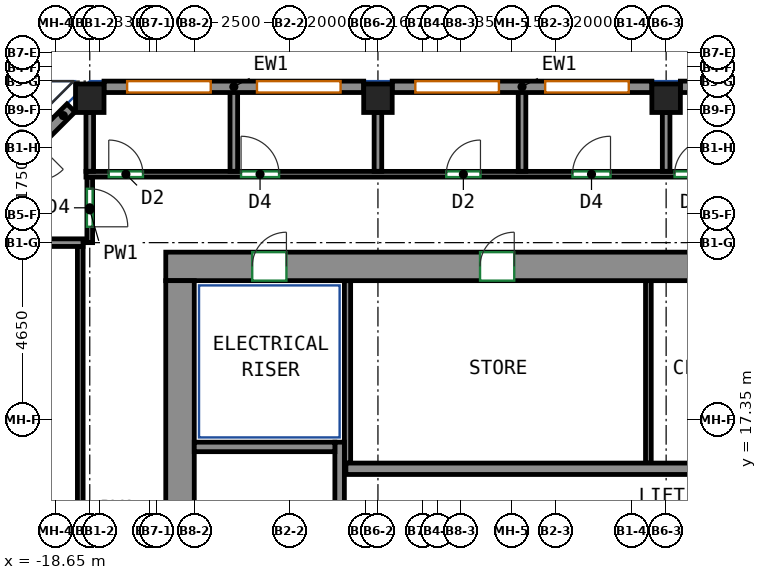
"""IFC4 building model, lengths in metres.
Left out: names, types, materials, properties, quantities, classifications, styles, units other than length and angle.
Written with IfcOpenShell. Run it as: python <this file> out.ifc"""

import sys

from ifc_helpers import new_model, si_unit, direction, frame, frame_2d, origin, origin_2d, place, context, subcontext, project, spatial, rectangle, extrude, source, transform, mapped, element, fill, save


model = new_model("IFC4")
c1 = context("Model", 3, precision=1e-05, world=origin(), true_north=direction((0.0, 1.0)))
c2 = subcontext(c1, "Body", "Model", "MODEL_VIEW")
j1 = project(units=[si_unit("LENGTHUNIT", "METRE"), si_unit("PLANEANGLEUNIT", "RADIAN")], contexts=[c1])
p1 = place(None, origin())
s1 = spatial("IfcSite", under=j1, at=p1, CompositionType="ELEMENT")
p2 = place(p1, origin())
s2 = spatial("IfcBuilding", under=s1, at=p2, CompositionType="ELEMENT")
p3 = place(p2, frame((0.0, 0.0, 199.9)))
s3 = spatial("IfcBuildingStorey", under=s2, at=p3, CompositionType="ELEMENT", Elevation=199.9)
m1 = source(origin(), c2, "Body", "SweptSolid", [
    extrude(rectangle(XDim=0.75, YDim=0.75, at=origin_2d()), origin(), (0.0, 0.0, 1.0), 3.12),
])
for number, where, z_axis, x_axis in (
    (1, (-17.75, 25.8, 0.0), (0.0, 0.0, 1.0), (1.0, 0.0, 0.0)),
    (2, (-10.167, 25.8, 0.0), (0.0, 0.0, 1.0), (1.0, 0.0, 0.0)),
    (3, (-2.583, 25.8, 0.0), (0.0, 0.0, 1.0), (1.0, 0.0, 0.0)),
):
    element("IfcColumn", number, at=place(p3, frame(where, z_axis=z_axis, x_axis=x_axis)), inside=s3, PredefinedType="COLUMN", context=c2, shape_type="MappedRepresentation", body=[
        mapped(m1, transform((0.0, 0.0, 0.0))),
    ])
m2 = source(origin(), c2, "Body", "SweptSolid", [
    extrude(rectangle(XDim=33.6, YDim=0.75, at=frame_2d((16.8, 0.0))), origin(), (0.0, 0.0, 1.0), 3.12),
])
p4 = place(p3, frame((-15.75, 21.375, 0.0), z_axis=(0.0, 0.0, 1.0), x_axis=(1.0, 0.0, 0.0)))
e4 = element("IfcWall", 4, at=p4, inside=s3, PredefinedType="SHEAR", context=c2, shape_type="MappedRepresentation", body=[
    mapped(m2, transform((0.0, 0.0, 0.0))),
])
p5 = place(p4, frame((8.27, 0.0, 0.0)))
e5 = element("IfcOpeningElement", 5, at=p5, cuts=e4, PredefinedType="OPENING", context=c2, shape_type="SweptSolid", body=[
    extrude(rectangle(XDim=0.9, YDim=2.1, at=frame_2d((0.45, 1.05))), frame((0.0, 0.385, 0.0), z_axis=(0.0, -1.0, 0.0), x_axis=(1.0, 0.0, 0.0)), (0.0, 0.0, 1.0), 0.77),
])
p6 = place(p4, frame((14.97, 0.0, 0.0)))
e6 = element("IfcOpeningElement", 6, at=p6, cuts=e4, PredefinedType="OPENING", context=c2, shape_type="SweptSolid", body=[
    extrude(rectangle(XDim=0.9, YDim=2.1, at=frame_2d((0.45, 1.05))), frame((0.0, 0.385, 0.0), z_axis=(0.0, -1.0, 0.0), x_axis=(1.0, 0.0, 0.0)), (0.0, 0.0, 1.0), 0.77),
])
p7 = place(p4, frame((19.794, 0.0, 0.0)))
e7 = element("IfcOpeningElement", 7, at=p7, cuts=e4, PredefinedType="OPENING", context=c2, shape_type="SweptSolid", body=[
    extrude(rectangle(XDim=0.9, YDim=2.1, at=frame_2d((0.45, 1.05))), frame((0.0, 0.385, 0.0), z_axis=(0.0, -1.0, 0.0), x_axis=(1.0, 0.0, 0.0)), (0.0, 0.0, 1.0), 0.77),
])
p8 = place(p4, frame((25.154, 0.0, 0.0)))
e8 = element("IfcOpeningElement", 8, at=p8, cuts=e4, PredefinedType="OPENING", context=c2, shape_type="SweptSolid", body=[
    extrude(rectangle(XDim=0.9, YDim=2.1, at=frame_2d((0.45, 1.05))), frame((0.0, 0.385, 0.0), z_axis=(0.0, -1.0, 0.0), x_axis=(1.0, 0.0, 0.0)), (0.0, 0.0, 1.0), 0.77),
])
p9 = place(p4, frame((2.275, 0.0, 0.0)))
e9 = element("IfcOpeningElement", 9, at=p9, cuts=e4, PredefinedType="OPENING", context=c2, shape_type="SweptSolid", body=[
    extrude(rectangle(XDim=0.9, YDim=2.1, at=frame_2d((0.45, 1.05))), frame((0.0, 0.385, 0.0), z_axis=(0.0, -1.0, 0.0), x_axis=(1.0, 0.0, 0.0)), (0.0, 0.0, 1.0), 0.77),
])
p10 = place(p4, frame((30.425, 0.0, 0.0)))
e10 = element("IfcOpeningElement", 10, at=p10, cuts=e4, PredefinedType="OPENING", context=c2, shape_type="SweptSolid", body=[
    extrude(rectangle(XDim=0.9, YDim=2.1, at=frame_2d((0.45, 1.05))), frame((0.0, 0.385, 0.0), z_axis=(0.0, -1.0, 0.0), x_axis=(1.0, 0.0, 0.0)), (0.0, 0.0, 1.0), 0.77),
])
m3 = source(origin(), c2, "Body", "SweptSolid", [
    extrude(rectangle(XDim=12.0, YDim=0.75, at=frame_2d((6.0, 0.0))), origin(), (0.0, 0.0, 1.0), 3.12),
])
p11 = place(p3, frame((-15.375, 9.0, 0.0), z_axis=(0.0, 0.0, 1.0), x_axis=(0.0, 1.0, 0.0)))
e11 = element("IfcWall", 11, at=p11, inside=s3, PredefinedType="SHEAR", context=c2, shape_type="MappedRepresentation", body=[
    mapped(m3, transform((0.0, 0.0, 0.0))),
])
m4 = source(origin(), c2, "Body", "SweptSolid", [
    extrude(rectangle(XDim=7.75, YDim=0.25, at=frame_2d((3.875, 0.0))), origin(), (0.0, 0.0, 1.0), 3.12),
])
p12 = place(p3, frame((-11.175, 9.0, 0.0), z_axis=(0.0, 0.0, 1.0), x_axis=(0.0, 1.0, 0.0)))
e12 = element("IfcWall", 12, at=p12, inside=s3, PredefinedType="SHEAR", context=c2, shape_type="MappedRepresentation", body=[
    mapped(m4, transform((0.0, 0.0, 0.0))),
])
m5 = source(origin(), c2, "Body", "SweptSolid", [
    extrude(rectangle(XDim=3.7, YDim=0.25, at=frame_2d((1.85, 0.0))), origin(), (0.0, 0.0, 1.0), 3.12),
])
p13 = place(p3, frame((-15.0, 16.625, 0.0), z_axis=(0.0, 0.0, 1.0), x_axis=(1.0, 0.0, 0.0)))
e13 = element("IfcWall", 13, at=p13, inside=s3, PredefinedType="SHEAR", context=c2, shape_type="MappedRepresentation", body=[
    mapped(m5, transform((0.0, 0.0, 0.0))),
])
m6 = source(origin(), c2, "Body", "SweptSolid", [
    extrude(rectangle(XDim=14.04, YDim=0.3, at=frame_2d((7.02, 0.0))), origin(), (0.0, 0.0, 1.0), 3.12),
])
p14 = place(p3, frame((-11.01, 16.05, 0.0), z_axis=(0.0, 0.0, 1.0), x_axis=(1.0, 0.0, 0.0)))
e14 = element("IfcWall", 14, at=p14, inside=s3, PredefinedType="SHEAR", context=c2, shape_type="MappedRepresentation", body=[
    mapped(m6, transform((0.0, 0.0, 0.0))),
])
m7 = source(origin(), c2, "Body", "SweptSolid", [
    extrude(rectangle(XDim=6.833, YDim=0.3, at=frame_2d((3.417, 0.0))), origin(), (0.0, 0.0, 1.0), 3.12),
])
p15 = place(p3, frame((4.625, 26.1, 0.0), z_axis=(0.0, 0.0, 1.0), x_axis=(-1.0, 0.0, 0.0)))
e15 = element("IfcWall", 15, at=p15, inside=s3, PredefinedType="SOLIDWALL", context=c2, shape_type="MappedRepresentation", body=[
    mapped(m7, transform((0.0, 0.0, 0.0))),
])
p16 = place(p15, frame((0.608, 0.0, 0.85)))
e16 = element("IfcOpeningElement", 16, at=p16, cuts=e15, PredefinedType="OPENING", context=c2, shape_type="SweptSolid", body=[
    extrude(rectangle(XDim=2.2, YDim=1.95, at=frame_2d((1.1, 0.975))), frame((0.0, 0.16, 0.0), z_axis=(0.0, -1.0, 0.0), x_axis=(1.0, 0.0, 0.0)), (0.0, 0.0, 1.0), 0.32),
])
p17 = place(p15, frame((4.025, 0.0, 0.85)))
e17 = element("IfcOpeningElement", 17, at=p17, cuts=e15, PredefinedType="OPENING", context=c2, shape_type="SweptSolid", body=[
    extrude(rectangle(XDim=2.2, YDim=1.95, at=frame_2d((1.1, 0.975))), frame((0.0, 0.16, 0.0), z_axis=(0.0, -1.0, 0.0), x_axis=(1.0, 0.0, 0.0)), (0.0, 0.0, 1.0), 0.32),
])
m8 = source(origin(), c2, "Body", "SweptSolid", [
    extrude(rectangle(XDim=6.833, YDim=0.3, at=frame_2d((3.417, 0.0))), origin(), (0.0, 0.0, 1.0), 3.12),
])
p18 = place(p3, frame((-2.958, 26.1, 0.0), z_axis=(0.0, 0.0, 1.0), x_axis=(-1.0, 0.0, 0.0)))
e18 = element("IfcWall", 18, at=p18, inside=s3, PredefinedType="SOLIDWALL", context=c2, shape_type="MappedRepresentation", body=[
    mapped(m8, transform((0.0, 0.0, 0.0))),
])
p19 = place(p18, frame((0.608, 0.0, 0.85)))
e19 = element("IfcOpeningElement", 19, at=p19, cuts=e18, PredefinedType="OPENING", context=c2, shape_type="SweptSolid", body=[
    extrude(rectangle(XDim=2.2, YDim=1.95, at=frame_2d((1.1, 0.975))), frame((0.0, 0.16, 0.0), z_axis=(0.0, -1.0, 0.0), x_axis=(1.0, 0.0, 0.0)), (0.0, 0.0, 1.0), 0.32),
])
p20 = place(p18, frame((4.025, 0.0, 0.85)))
e20 = element("IfcOpeningElement", 20, at=p20, cuts=e18, PredefinedType="OPENING", context=c2, shape_type="SweptSolid", body=[
    extrude(rectangle(XDim=2.2, YDim=1.95, at=frame_2d((1.1, 0.975))), frame((0.0, 0.16, 0.0), z_axis=(0.0, -1.0, 0.0), x_axis=(1.0, 0.0, 0.0)), (0.0, 0.0, 1.0), 0.32),
])
p21 = place(p3, frame((-10.542, 26.1, 0.0), z_axis=(0.0, 0.0, 1.0), x_axis=(-1.0, 0.0, 0.0)))
e21 = element("IfcWall", 21, at=p21, inside=s3, PredefinedType="SOLIDWALL", context=c2, shape_type="MappedRepresentation", body=[
    mapped(m7, transform((0.0, 0.0, 0.0))),
])
p22 = place(p21, frame((0.608, 0.0, 0.85)))
e22 = element("IfcOpeningElement", 22, at=p22, cuts=e21, PredefinedType="OPENING", context=c2, shape_type="SweptSolid", body=[
    extrude(rectangle(XDim=2.2, YDim=1.95, at=frame_2d((1.1, 0.975))), frame((0.0, 0.16, 0.0), z_axis=(0.0, -1.0, 0.0), x_axis=(1.0, 0.0, 0.0)), (0.0, 0.0, 1.0), 0.32),
])
p23 = place(p21, frame((4.025, 0.0, 0.85)))
e23 = element("IfcOpeningElement", 23, at=p23, cuts=e21, PredefinedType="OPENING", context=c2, shape_type="SweptSolid", body=[
    extrude(rectangle(XDim=2.2, YDim=1.95, at=frame_2d((1.1, 0.975))), frame((0.0, 0.16, 0.0), z_axis=(0.0, -1.0, 0.0), x_axis=(1.0, 0.0, 0.0)), (0.0, 0.0, 1.0), 0.32),
])
m9 = source(origin(), c2, "Body", "SweptSolid", [
    extrude(rectangle(XDim=3.571, YDim=0.3, at=frame_2d((1.786, 0.0))), origin(), (0.0, 0.0, 1.0), 3.12),
])
p24 = place(p3, frame((-18.244, 25.544, 0.0), z_axis=(0.0, 0.0, 1.0), x_axis=(-0.707072595841, -0.707140964879, 0.0)))
e24 = element("IfcWall", 24, at=p24, inside=s3, PredefinedType="SOLIDWALL", context=c2, shape_type="MappedRepresentation", body=[
    mapped(m9, transform((0.0, 0.0, 0.0))),
])
p25 = place(p24, frame((1.285, 0.0, 0.0)))
e25 = element("IfcOpeningElement", 25, at=p25, cuts=e24, PredefinedType="OPENING", context=c2, shape_type="SweptSolid", body=[
    extrude(rectangle(XDim=1.0, YDim=2.1, at=frame_2d((0.5, 1.05))), frame((0.0, 0.16, 0.0), z_axis=(0.0, -1.0, 0.0), x_axis=(1.0, 0.0, 0.0)), (0.0, 0.0, 1.0), 0.32),
])
m10 = source(origin(), c2, "Body", "SweptSolid", [
    extrude(rectangle(XDim=4.8, YDim=0.165, at=frame_2d((2.4, 0.0))), origin(), (0.0, 0.0, 1.0), 3.12),
])
p26 = place(p3, frame((-10.968, 16.2, 0.0), z_axis=(0.0, 0.0, 1.0), x_axis=(0.0, 1.0, 0.0)))
e26 = element("IfcWall", 26, at=p26, inside=s3, PredefinedType="PARTITIONING", context=c2, shape_type="MappedRepresentation", body=[
    mapped(m10, transform((0.0, 0.0, 0.0))),
])
m11 = source(origin(), c2, "Body", "SweptSolid", [
    extrude(rectangle(XDim=4.8, YDim=0.15, at=frame_2d((2.4, 0.0))), origin(), (0.0, 0.0, 1.0), 3.12),
])
p27 = place(p3, frame((-3.05, 16.2, 0.0), z_axis=(0.0, 0.0, 1.0), x_axis=(0.0, 1.0, 0.0)))
e27 = element("IfcWall", 27, at=p27, inside=s3, PredefinedType="PARTITIONING", context=c2, shape_type="MappedRepresentation", body=[
    mapped(m11, transform((0.0, 0.0, 0.0))),
])
p28 = place(p3, frame((-18.0, 21.9, 0.0), z_axis=(0.0, 0.0, 1.0), x_axis=(0.0, -1.0, 0.0)))
e28 = element("IfcWall", 28, at=p28, inside=s3, PredefinedType="PARTITIONING", context=c2, shape_type="SweptSolid", body=[
    extrude(rectangle(XDim=13.825, YDim=0.15, at=frame_2d((6.913, 0.0))), origin(), (0.0, 0.0, 1.0), 3.12),
])
p29 = place(p28, frame((10.721, 0.0, 0.0)))
e29 = element("IfcOpeningElement", 29, at=p29, cuts=e28, PredefinedType="OPENING", context=c2, shape_type="SweptSolid", body=[
    extrude(rectangle(XDim=1.0, YDim=2.1, at=frame_2d((0.5, 1.05))), frame((0.0, 0.085, 0.0), z_axis=(0.0, -1.0, 0.0), x_axis=(1.0, 0.0, 0.0)), (0.0, 0.0, 1.0), 0.17),
])
p30 = place(p3, frame((-17.75, 23.725, 0.0), z_axis=(0.0, 0.0, 1.0), x_axis=(0.0, -1.0, 0.0)))
e30 = element("IfcWall", 30, at=p30, inside=s3, PredefinedType="PARTITIONING", context=c2, shape_type="SweptSolid", body=[
    extrude(rectangle(XDim=1.725, YDim=0.15, at=frame_2d((0.863, 0.0))), origin(), (0.0, 0.0, 1.0), 3.12),
])
p31 = place(p30, frame((0.308, 0.0, 0.0)))
e31 = element("IfcOpeningElement", 31, at=p31, cuts=e30, PredefinedType="OPENING", context=c2, shape_type="SweptSolid", body=[
    extrude(rectangle(XDim=1.0, YDim=2.1, at=frame_2d((0.5, 1.05))), frame((0.0, 0.085, 0.0), z_axis=(0.0, -1.0, 0.0), x_axis=(1.0, 0.0, 0.0)), (0.0, 0.0, 1.0), 0.17),
])
p32 = place(p3, frame((-17.85, 23.8, 0.0), z_axis=(0.0, 0.0, 1.0), x_axis=(1.0, 0.0, 0.0)))
e32 = element("IfcWall", 32, at=p32, inside=s3, PredefinedType="PARTITIONING", context=c2, shape_type="SweptSolid", body=[
    extrude(rectangle(XDim=45.7, YDim=0.15, at=frame_2d((22.85, 0.0))), origin(), (0.0, 0.0, 1.0), 3.12),
])
p33 = place(p32, frame((0.6, 0.0, 0.0)))
e33 = element("IfcOpeningElement", 33, at=p33, cuts=e32, PredefinedType="OPENING", context=c2, shape_type="SweptSolid", body=[
    extrude(rectangle(XDim=0.9, YDim=2.1, at=frame_2d((0.45, 1.05))), frame((0.0, 0.085, 0.0), z_axis=(0.0, -1.0, 0.0), x_axis=(1.0, 0.0, 0.0)), (0.0, 0.0, 1.0), 0.17),
])
p34 = place(p32, frame((4.081, 0.0, 0.0)))
e34 = element("IfcOpeningElement", 34, at=p34, cuts=e32, PredefinedType="OPENING", context=c2, shape_type="SweptSolid", body=[
    extrude(rectangle(XDim=1.0, YDim=2.1, at=frame_2d((0.5, 1.05))), frame((0.0, 0.085, 0.0), z_axis=(0.0, -1.0, 0.0), x_axis=(1.0, 0.0, 0.0)), (0.0, 0.0, 1.0), 0.17),
])
p35 = place(p32, frame((9.481, 0.0, 0.0)))
e35 = element("IfcOpeningElement", 35, at=p35, cuts=e32, PredefinedType="OPENING", context=c2, shape_type="SweptSolid", body=[
    extrude(rectangle(XDim=0.9, YDim=2.1, at=frame_2d((0.45, 1.05))), frame((0.0, 0.085, 0.0), z_axis=(0.0, -1.0, 0.0), x_axis=(1.0, 0.0, 0.0)), (0.0, 0.0, 1.0), 0.17),
])
p36 = place(p32, frame((12.803, 0.0, 0.0)))
e36 = element("IfcOpeningElement", 36, at=p36, cuts=e32, PredefinedType="OPENING", context=c2, shape_type="SweptSolid", body=[
    extrude(rectangle(XDim=1.0, YDim=2.1, at=frame_2d((0.5, 1.05))), frame((0.0, 0.085, 0.0), z_axis=(0.0, -1.0, 0.0), x_axis=(1.0, 0.0, 0.0)), (0.0, 0.0, 1.0), 0.17),
])
p37 = place(p32, frame((15.489, 0.0, 0.0)))
e37 = element("IfcOpeningElement", 37, at=p37, cuts=e32, PredefinedType="OPENING", context=c2, shape_type="SweptSolid", body=[
    extrude(rectangle(XDim=0.9, YDim=2.1, at=frame_2d((0.45, 1.05))), frame((0.0, 0.085, 0.0), z_axis=(0.0, -1.0, 0.0), x_axis=(1.0, 0.0, 0.0)), (0.0, 0.0, 1.0), 0.17),
])
p38 = place(p32, frame((21.244, 0.0, 0.0)))
e38 = element("IfcOpeningElement", 38, at=p38, cuts=e32, PredefinedType="OPENING", context=c2, shape_type="SweptSolid", body=[
    extrude(rectangle(XDim=0.9, YDim=2.1, at=frame_2d((0.45, 1.05))), frame((0.0, 0.085, 0.0), z_axis=(0.0, -1.0, 0.0), x_axis=(1.0, 0.0, 0.0)), (0.0, 0.0, 1.0), 0.17),
])
p39 = place(p32, frame((23.542, 0.0, 0.0)))
e39 = element("IfcOpeningElement", 39, at=p39, cuts=e32, PredefinedType="OPENING", context=c2, shape_type="SweptSolid", body=[
    extrude(rectangle(XDim=1.0, YDim=2.1, at=frame_2d((0.5, 1.05))), frame((0.0, 0.085, 0.0), z_axis=(0.0, -1.0, 0.0), x_axis=(1.0, 0.0, 0.0)), (0.0, 0.0, 1.0), 0.17),
])
p40 = place(p32, frame((28.841, 0.0, 0.0)))
e40 = element("IfcOpeningElement", 40, at=p40, cuts=e32, PredefinedType="OPENING", context=c2, shape_type="SweptSolid", body=[
    extrude(rectangle(XDim=0.9, YDim=2.1, at=frame_2d((0.45, 1.05))), frame((0.0, 0.085, 0.0), z_axis=(0.0, -1.0, 0.0), x_axis=(1.0, 0.0, 0.0)), (0.0, 0.0, 1.0), 0.17),
])
p41 = place(p32, frame((32.331, 0.0, 0.0)))
e41 = element("IfcOpeningElement", 41, at=p41, cuts=e32, PredefinedType="OPENING", context=c2, shape_type="SweptSolid", body=[
    extrude(rectangle(XDim=1.0, YDim=2.1, at=frame_2d((0.5, 1.05))), frame((0.0, 0.085, 0.0), z_axis=(0.0, -1.0, 0.0), x_axis=(1.0, 0.0, 0.0)), (0.0, 0.0, 1.0), 0.17),
])
p42 = place(p32, frame((35.42, 0.0, 0.0)))
e42 = element("IfcOpeningElement", 42, at=p42, cuts=e32, PredefinedType="OPENING", context=c2, shape_type="SweptSolid", body=[
    extrude(rectangle(XDim=0.9, YDim=2.1, at=frame_2d((0.45, 1.05))), frame((0.0, 0.085, 0.0), z_axis=(0.0, -1.0, 0.0), x_axis=(1.0, 0.0, 0.0)), (0.0, 0.0, 1.0), 0.17),
])
p43 = place(p32, frame((40.317, 0.0, 0.0)))
e43 = element("IfcOpeningElement", 43, at=p43, cuts=e32, PredefinedType="OPENING", context=c2, shape_type="SweptSolid", body=[
    extrude(rectangle(XDim=0.9, YDim=2.1, at=frame_2d((0.45, 1.05))), frame((0.0, 0.085, 0.0), z_axis=(0.0, -1.0, 0.0), x_axis=(1.0, 0.0, 0.0)), (0.0, 0.0, 1.0), 0.17),
])
p44 = place(p32, frame((43.199, 0.0, 0.0)))
e44 = element("IfcOpeningElement", 44, at=p44, cuts=e32, PredefinedType="OPENING", context=c2, shape_type="SweptSolid", body=[
    extrude(rectangle(XDim=1.0, YDim=2.1, at=frame_2d((0.5, 1.05))), frame((0.0, 0.085, 0.0), z_axis=(0.0, -1.0, 0.0), x_axis=(1.0, 0.0, 0.0)), (0.0, 0.0, 1.0), 0.17),
])
p45 = place(p3, frame((-17.927, 22.0, 0.0), z_axis=(0.0, 0.0, 1.0), x_axis=(-1.0, 0.0, 0.0)))
e45 = element("IfcWall", 45, at=p45, inside=s3, PredefinedType="PARTITIONING", context=c2, shape_type="SweptSolid", body=[
    extrude(rectangle(XDim=2.63, YDim=0.2, at=frame_2d((1.315, 0.0))), origin(), (0.0, 0.0, 1.0), 3.12),
])
p46 = place(p3, frame((-17.75, 23.877, 0.0), z_axis=(0.0, 0.0, 1.0), x_axis=(0.0, 1.0, 0.0)))
e46 = element("IfcWall", 46, at=p46, inside=s3, PredefinedType="PARTITIONING", context=c2, shape_type="SweptSolid", body=[
    extrude(rectangle(XDim=1.548, YDim=0.2, at=frame_2d((0.774, 0.0))), origin(), (0.0, 0.0, 1.0), 3.12),
])
p47 = place(p3, frame((-13.959, 23.877, 0.0), z_axis=(0.0, 0.0, 1.0), x_axis=(0.0, 1.0, 0.0)))
e47 = element("IfcWall", 47, at=p47, inside=s3, PredefinedType="PARTITIONING", context=c2, shape_type="SweptSolid", body=[
    extrude(rectangle(XDim=2.123, YDim=0.2, at=frame_2d((1.062, 0.0))), origin(), (0.0, 0.0, 1.0), 3.12),
])
p48 = place(p3, frame((-10.167, 23.877, 0.0), z_axis=(0.0, 0.0, 1.0), x_axis=(0.0, 1.0, 0.0)))
e48 = element("IfcWall", 48, at=p48, inside=s3, PredefinedType="PARTITIONING", context=c2, shape_type="SweptSolid", body=[
    extrude(rectangle(XDim=1.548, YDim=0.2, at=frame_2d((0.774, 0.0))), origin(), (0.0, 0.0, 1.0), 3.12),
])
p49 = place(p3, frame((-6.375, 23.877, 0.0), z_axis=(0.0, 0.0, 1.0), x_axis=(0.0, 1.0, 0.0)))
e49 = element("IfcWall", 49, at=p49, inside=s3, PredefinedType="PARTITIONING", context=c2, shape_type="SweptSolid", body=[
    extrude(rectangle(XDim=2.123, YDim=0.2, at=frame_2d((1.062, 0.0))), origin(), (0.0, 0.0, 1.0), 3.12),
])
p50 = place(p3, frame((-2.583, 23.877, 0.0), z_axis=(0.0, 0.0, 1.0), x_axis=(0.0, 1.0, 0.0)))
e50 = element("IfcWall", 50, at=p50, inside=s3, PredefinedType="PARTITIONING", context=c2, shape_type="SweptSolid", body=[
    extrude(rectangle(XDim=1.548, YDim=0.2, at=frame_2d((0.774, 0.0))), origin(), (0.0, 0.0, 1.0), 3.12),
])
p51 = place(p19, origin())
e51 = element("IfcWindow", 51, at=p51, inside=s3, PartitioningType="SINGLE_PANEL", PredefinedType="WINDOW", context=c2, shape_type="SweptSolid", body=[
    extrude(rectangle(XDim=2.2, YDim=1.95, at=frame_2d((1.1, 0.975))), frame((0.0, 0.03, 0.0), z_axis=(0.0, -1.0, 0.0), x_axis=(1.0, 0.0, 0.0)), (0.0, 0.0, 1.0), 0.06),
])
fill(e19, e51)
p52 = place(p20, origin())
e52 = element("IfcWindow", 52, at=p52, inside=s3, PartitioningType="SINGLE_PANEL", PredefinedType="WINDOW", context=c2, shape_type="SweptSolid", body=[
    extrude(rectangle(XDim=2.2, YDim=1.95, at=frame_2d((1.1, 0.975))), frame((0.0, 0.03, 0.0), z_axis=(0.0, -1.0, 0.0), x_axis=(1.0, 0.0, 0.0)), (0.0, 0.0, 1.0), 0.06),
])
fill(e20, e52)
p53 = place(p22, origin())
e53 = element("IfcWindow", 53, at=p53, inside=s3, PartitioningType="SINGLE_PANEL", PredefinedType="WINDOW", context=c2, shape_type="SweptSolid", body=[
    extrude(rectangle(XDim=2.2, YDim=1.95, at=frame_2d((1.1, 0.975))), frame((0.0, 0.03, 0.0), z_axis=(0.0, -1.0, 0.0), x_axis=(1.0, 0.0, 0.0)), (0.0, 0.0, 1.0), 0.06),
])
fill(e22, e53)
p54 = place(p23, origin())
e54 = element("IfcWindow", 54, at=p54, inside=s3, PartitioningType="SINGLE_PANEL", PredefinedType="WINDOW", context=c2, shape_type="SweptSolid", body=[
    extrude(rectangle(XDim=2.2, YDim=1.95, at=frame_2d((1.1, 0.975))), frame((0.0, 0.03, 0.0), z_axis=(0.0, -1.0, 0.0), x_axis=(1.0, 0.0, 0.0)), (0.0, 0.0, 1.0), 0.06),
])
fill(e23, e54)
p55 = place(p5, origin())
e55 = element("IfcDoor", 55, at=p55, inside=s3, OperationType="SINGLE_SWING_RIGHT", PredefinedType="DOOR", context=c2, shape_type="SweptSolid", body=[
    extrude(rectangle(XDim=0.9, YDim=2.1, at=frame_2d((0.45, 1.05))), frame((0.0, -0.23, 0.0), z_axis=(0.0, -1.0, 0.0), x_axis=(1.0, 0.0, 0.0)), (0.0, 0.0, 1.0), 0.05),
])
fill(e5, e55)
p56 = place(p9, origin())
e56 = element("IfcDoor", 56, at=p56, inside=s3, OperationType="SINGLE_SWING_RIGHT", PredefinedType="DOOR", context=c2, shape_type="SweptSolid", body=[
    extrude(rectangle(XDim=0.9, YDim=2.1, at=frame_2d((0.45, 1.05))), frame((0.0, -0.23, 0.0), z_axis=(0.0, -1.0, 0.0), x_axis=(1.0, 0.0, 0.0)), (0.0, 0.0, 1.0), 0.05),
])
fill(e9, e56)
p57 = place(p31, origin())
e57 = element("IfcDoor", 57, at=p57, inside=s3, OperationType="SINGLE_SWING_RIGHT", PredefinedType="DOOR", context=c2, shape_type="SweptSolid", body=[
    extrude(rectangle(XDim=1.0, YDim=2.1, at=frame_2d((0.5, 1.05))), frame((0.0, 0.025, 0.0), z_axis=(0.0, -1.0, 0.0), x_axis=(1.0, 0.0, 0.0)), (0.0, 0.0, 1.0), 0.05),
])
fill(e31, e57)
p58 = place(p33, origin())
e58 = element("IfcDoor", 58, at=p58, inside=s3, OperationType="SINGLE_SWING_LEFT", PredefinedType="DOOR", context=c2, shape_type="SweptSolid", body=[
    extrude(rectangle(XDim=0.9, YDim=2.1, at=frame_2d((0.45, 1.05))), frame((0.0, 0.025, 0.0), z_axis=(0.0, -1.0, 0.0), x_axis=(1.0, 0.0, 0.0)), (0.0, 0.0, 1.0), 0.05),
])
fill(e33, e58)
p59 = place(p34, origin())
e59 = element("IfcDoor", 59, at=p59, inside=s3, OperationType="SINGLE_SWING_LEFT", PredefinedType="DOOR", context=c2, shape_type="SweptSolid", body=[
    extrude(rectangle(XDim=1.0, YDim=2.1, at=frame_2d((0.5, 1.05))), frame((0.0, 0.025, 0.0), z_axis=(0.0, -1.0, 0.0), x_axis=(1.0, 0.0, 0.0)), (0.0, 0.0, 1.0), 0.05),
])
fill(e34, e59)
p60 = place(p35, origin())
e60 = element("IfcDoor", 60, at=p60, inside=s3, OperationType="SINGLE_SWING_RIGHT", PredefinedType="DOOR", context=c2, shape_type="SweptSolid", body=[
    extrude(rectangle(XDim=0.9, YDim=2.1, at=frame_2d((0.45, 1.05))), frame((0.0, 0.025, 0.0), z_axis=(0.0, -1.0, 0.0), x_axis=(1.0, 0.0, 0.0)), (0.0, 0.0, 1.0), 0.05),
])
fill(e35, e60)
p61 = place(p36, origin())
e61 = element("IfcDoor", 61, at=p61, inside=s3, OperationType="SINGLE_SWING_RIGHT", PredefinedType="DOOR", context=c2, shape_type="SweptSolid", body=[
    extrude(rectangle(XDim=1.0, YDim=2.1, at=frame_2d((0.5, 1.05))), frame((0.0, 0.025, 0.0), z_axis=(0.0, -1.0, 0.0), x_axis=(1.0, 0.0, 0.0)), (0.0, 0.0, 1.0), 0.05),
])
fill(e36, e61)
p62 = place(p37, origin())
e62 = element("IfcDoor", 62, at=p62, inside=s3, OperationType="SINGLE_SWING_RIGHT", PredefinedType="DOOR", context=c2, shape_type="SweptSolid", body=[
    extrude(rectangle(XDim=0.9, YDim=2.1, at=frame_2d((0.45, 1.05))), frame((0.0, 0.025, 0.0), z_axis=(0.0, -1.0, 0.0), x_axis=(1.0, 0.0, 0.0)), (0.0, 0.0, 1.0), 0.05),
])
fill(e37, e62)
save(model, sys.argv[1])
